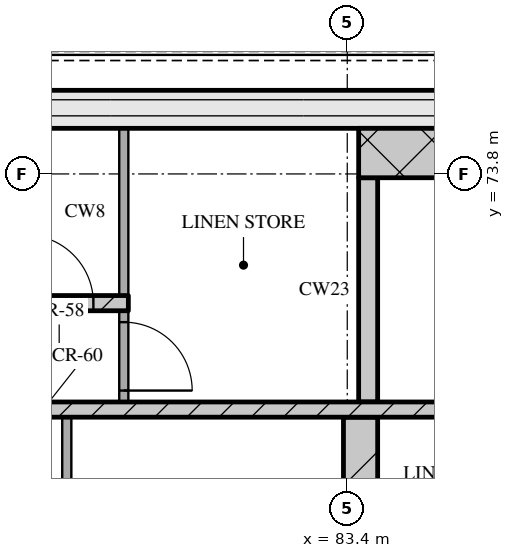
"""IFC4 building model, lengths in metres.
Left out: names, types, materials, properties, quantities, classifications, styles, units other than length and angle.
Written with IfcOpenShell. Run it as: python <this file> out.ifc"""

import sys

from ifc_helpers import new_model, si_unit, direction, frame, frame_2d, origin, place, context, subcontext, project, spatial, rectangle, extrude, element, fill, save


model = new_model("IFC4")
c1 = context("Model", 3, precision=1e-05, world=origin(), true_north=direction((0.0, 1.0)))
c2 = subcontext(c1, "Body", "Model", "MODEL_VIEW")
j1 = project(units=[si_unit("LENGTHUNIT", "METRE"), si_unit("PLANEANGLEUNIT", "RADIAN")], contexts=[c1])
p1 = place(None, origin())
s1 = spatial("IfcSite", under=j1, at=p1, CompositionType="ELEMENT")
p2 = place(p1, origin())
s2 = spatial("IfcBuilding", under=s1, at=p2, CompositionType="ELEMENT")
p3 = place(p2, frame((0.0, 0.0, 274.35)))
s3 = spatial("IfcBuildingStorey", under=s2, at=p3, CompositionType="ELEMENT", Elevation=274.35)
p4 = place(p3, frame((67.3, 74.65, 0.0), z_axis=(0.0, 0.0, 1.0), x_axis=(1.0, 0.0, 0.0)))
e1 = element("IfcWall", 1, at=p4, inside=s3, PredefinedType="SOLIDWALL", context=c2, shape_type="SweptSolid", body=[
    extrude(rectangle(XDim=40.6, YDim=0.5, at=frame_2d((20.3, 0.0))), origin(), (0.0, 0.0, 1.0), 3.32),
])
p5 = place(p3, frame((79.71, 68.0, 0.0), z_axis=(0.0, 0.0, 1.0), x_axis=(0.0, 1.0, 0.0)))
e2 = element("IfcWall", 2, at=p5, inside=s3, PredefinedType="PARTITIONING", context=c2, shape_type="SweptSolid", body=[
    extrude(rectangle(XDim=2.6, YDim=0.12, at=frame_2d((1.3, 0.0))), origin(), (0.0, 0.0, 1.0), 3.32),
])
p6 = place(p3, frame((83.575, 68.0, 0.0), z_axis=(0.0, 0.0, 1.0), x_axis=(0.0, 1.0, 0.0)))
e3 = element("IfcWall", 3, at=p6, inside=s3, PredefinedType="SOLIDWALL", context=c2, shape_type="SweptSolid", body=[
    extrude(rectangle(XDim=2.6, YDim=0.45, at=frame_2d((1.3, 0.0))), origin(), (0.0, 0.0, 1.0), 3.32),
])
p7 = place(p3, frame((67.8, 70.7, 0.0), z_axis=(0.0, 0.0, 1.0), x_axis=(1.0, 0.0, 0.0)))
e4 = element("IfcWall", 4, at=p7, inside=s3, PredefinedType="SOLIDWALL", context=c2, shape_type="SweptSolid", body=[
    extrude(rectangle(XDim=39.6, YDim=0.2, at=frame_2d((19.8, 0.0))), origin(), (0.0, 0.0, 1.0), 3.32),
])
p8 = place(p7, frame((0.65, 0.0, 0.0)))
e5 = element("IfcOpeningElement", 5, at=p8, cuts=e4, PredefinedType="OPENING", context=c2, shape_type="SweptSolid", body=[
    extrude(rectangle(XDim=1.1, YDim=2.1, at=frame_2d((0.55, 1.05))), frame((0.0, 0.11, 0.0), z_axis=(0.0, -1.0, 0.0), x_axis=(1.0, 0.0, 0.0)), (0.0, 0.0, 1.0), 0.22),
])
p9 = place(p7, frame((3.25, 0.0, 0.0)))
e6 = element("IfcOpeningElement", 6, at=p9, cuts=e4, PredefinedType="OPENING", context=c2, shape_type="SweptSolid", body=[
    extrude(rectangle(XDim=1.1, YDim=2.1, at=frame_2d((0.55, 1.05))), frame((0.0, 0.11, 0.0), z_axis=(0.0, -1.0, 0.0), x_axis=(1.0, 0.0, 0.0)), (0.0, 0.0, 1.0), 0.22),
])
p10 = place(p7, frame((5.9, 0.0, 0.0)))
e7 = element("IfcOpeningElement", 7, at=p10, cuts=e4, PredefinedType="OPENING", context=c2, shape_type="SweptSolid", body=[
    extrude(rectangle(XDim=1.0, YDim=2.1, at=frame_2d((0.5, 1.05))), frame((0.0, 0.11, 0.0), z_axis=(0.0, -1.0, 0.0), x_axis=(1.0, 0.0, 0.0)), (0.0, 0.0, 1.0), 0.22),
])
p11 = place(p7, frame((21.7, 0.0, 0.0)))
e8 = element("IfcOpeningElement", 8, at=p11, cuts=e4, PredefinedType="OPENING", context=c2, shape_type="SweptSolid", body=[
    extrude(rectangle(XDim=1.0, YDim=2.1, at=frame_2d((0.5, 1.05))), frame((0.0, 0.11, 0.0), z_axis=(0.0, -1.0, 0.0), x_axis=(1.0, 0.0, 0.0)), (0.0, 0.0, 1.0), 0.22),
])
p12 = place(p7, frame((32.7, 0.0, 0.0)))
e9 = element("IfcOpeningElement", 9, at=p12, cuts=e4, PredefinedType="OPENING", context=c2, shape_type="SweptSolid", body=[
    extrude(rectangle(XDim=1.0, YDim=2.1, at=frame_2d((0.5, 1.05))), frame((0.0, 0.11, 0.0), z_axis=(0.0, -1.0, 0.0), x_axis=(1.0, 0.0, 0.0)), (0.0, 0.0, 1.0), 0.22),
])
p13 = place(p7, frame((35.25, 0.0, 0.0)))
e10 = element("IfcOpeningElement", 10, at=p13, cuts=e4, PredefinedType="OPENING", context=c2, shape_type="SweptSolid", body=[
    extrude(rectangle(XDim=1.1, YDim=2.1, at=frame_2d((0.55, 1.05))), frame((0.0, 0.11, 0.0), z_axis=(0.0, -1.0, 0.0), x_axis=(1.0, 0.0, 0.0)), (0.0, 0.0, 1.0), 0.22),
])
p14 = place(p7, frame((37.85, 0.0, 0.0)))
e11 = element("IfcOpeningElement", 11, at=p14, cuts=e4, PredefinedType="OPENING", context=c2, shape_type="SweptSolid", body=[
    extrude(rectangle(XDim=1.1, YDim=2.1, at=frame_2d((0.55, 1.05))), frame((0.0, 0.11, 0.0), z_axis=(0.0, -1.0, 0.0), x_axis=(1.0, 0.0, 0.0)), (0.0, 0.0, 1.0), 0.22),
])
p15 = place(p3, frame((80.46, 70.8, 0.0), z_axis=(0.0, 0.0, 1.0), x_axis=(0.0, 1.0, 0.0)))
e12 = element("IfcWall", 12, at=p15, inside=s3, PredefinedType="PARTITIONING", context=c2, shape_type="SweptSolid", body=[
    extrude(rectangle(XDim=1.2, YDim=0.12, at=frame_2d((0.6, 0.0))), origin(), (0.0, 0.0, 1.0), 3.32),
])
p16 = place(p15, frame((0.15, 0.0, 0.0)))
e13 = element("IfcOpeningElement", 13, at=p16, cuts=e12, PredefinedType="OPENING", context=c2, shape_type="SweptSolid", body=[
    extrude(rectangle(XDim=0.9, YDim=2.1, at=frame_2d((0.45, 1.05))), frame((0.0, 0.07, 0.0), z_axis=(0.0, -1.0, 0.0), x_axis=(1.0, 0.0, 0.0)), (0.0, 0.0, 1.0), 0.14),
])
p17 = place(p3, frame((83.675, 70.8, 0.0), z_axis=(0.0, 0.0, 1.0), x_axis=(0.0, 1.0, 0.0)))
e14 = element("IfcWall", 14, at=p17, inside=s3, PredefinedType="SOLIDWALL", context=c2, shape_type="SweptSolid", body=[
    extrude(rectangle(XDim=2.95, YDim=0.25, at=frame_2d((1.475, 0.0))), origin(), (0.0, 0.0, 1.0), 3.32),
])
p18 = place(p3, frame((72.8, 72.1, 0.0), z_axis=(0.0, 0.0, 1.0), x_axis=(1.0, 0.0, 0.0)))
e15 = element("IfcWall", 15, at=p18, inside=s3, PredefinedType="SOLIDWALL", context=c2, shape_type="SweptSolid", body=[
    extrude(rectangle(XDim=7.72, YDim=0.2, at=frame_2d((3.86, 0.0))), origin(), (0.0, 0.0, 1.0), 3.32),
])
p19 = place(p18, frame((1.25, 0.0, 0.0)))
e16 = element("IfcOpeningElement", 16, at=p19, cuts=e15, PredefinedType="OPENING", context=c2, shape_type="SweptSolid", body=[
    extrude(rectangle(XDim=0.9, YDim=2.1, at=frame_2d((0.45, 1.05))), frame((0.0, 0.11, 0.0), z_axis=(0.0, -1.0, 0.0), x_axis=(1.0, 0.0, 0.0)), (0.0, 0.0, 1.0), 0.22),
])
p20 = place(p18, frame((4.2, 0.0, 0.0)))
e17 = element("IfcOpeningElement", 17, at=p20, cuts=e15, PredefinedType="OPENING", context=c2, shape_type="SweptSolid", body=[
    extrude(rectangle(XDim=0.9, YDim=2.1, at=frame_2d((0.45, 1.05))), frame((0.0, 0.11, 0.0), z_axis=(0.0, -1.0, 0.0), x_axis=(1.0, 0.0, 0.0)), (0.0, 0.0, 1.0), 0.22),
])
p21 = place(p18, frame((6.36, 0.0, 0.0)))
e18 = element("IfcOpeningElement", 18, at=p21, cuts=e15, PredefinedType="OPENING", context=c2, shape_type="SweptSolid", body=[
    extrude(rectangle(XDim=0.9, YDim=2.1, at=frame_2d((0.45, 1.05))), frame((0.0, 0.11, 0.0), z_axis=(0.0, -1.0, 0.0), x_axis=(1.0, 0.0, 0.0)), (0.0, 0.0, 1.0), 0.22),
])
p22 = place(p3, frame((80.46, 72.2, 0.0), z_axis=(0.0, 0.0, 1.0), x_axis=(0.0, 1.0, 0.0)))
e19 = element("IfcWall", 19, at=p22, inside=s3, PredefinedType="PARTITIONING", context=c2, shape_type="SweptSolid", body=[
    extrude(rectangle(XDim=2.2, YDim=0.12, at=frame_2d((1.1, 0.0))), origin(), (0.0, 0.0, 1.0), 3.32),
])
p23 = place(p3, frame((83.55, 74.075, 0.0), z_axis=(0.0, 0.0, 1.0), x_axis=(1.0, 0.0, 0.0)))
e20 = element("IfcWall", 20, at=p23, inside=s3, PredefinedType="SOLIDWALL", context=c2, shape_type="SweptSolid", body=[
    extrude(rectangle(XDim=8.1, YDim=0.65, at=frame_2d((4.05, 0.0))), origin(), (0.0, 0.0, 1.0), 3.32),
])
p24 = place(p16, origin())
e21 = element("IfcDoor", 21, at=p24, inside=s3, OperationType="SINGLE_SWING_RIGHT", PredefinedType="DOOR", context=c2, shape_type="SweptSolid", body=[
    extrude(rectangle(XDim=0.9, YDim=2.1, at=frame_2d((0.45, 1.05))), frame((0.0, 0.025, 0.0), z_axis=(0.0, -1.0, 0.0), x_axis=(1.0, 0.0, 0.0)), (0.0, 0.0, 1.0), 0.05),
])
fill(e13, e21)
p25 = place(p21, origin())
e22 = element("IfcDoor", 22, at=p25, inside=s3, OperationType="SINGLE_SWING_LEFT", PredefinedType="DOOR", context=c2, shape_type="SweptSolid", body=[
    extrude(rectangle(XDim=0.9, YDim=2.1, at=frame_2d((0.45, 1.05))), frame((0.0, 0.025, 0.0), z_axis=(0.0, -1.0, 0.0), x_axis=(1.0, 0.0, 0.0)), (0.0, 0.0, 1.0), 0.05),
])
fill(e18, e22)
save(model, sys.argv[1])
